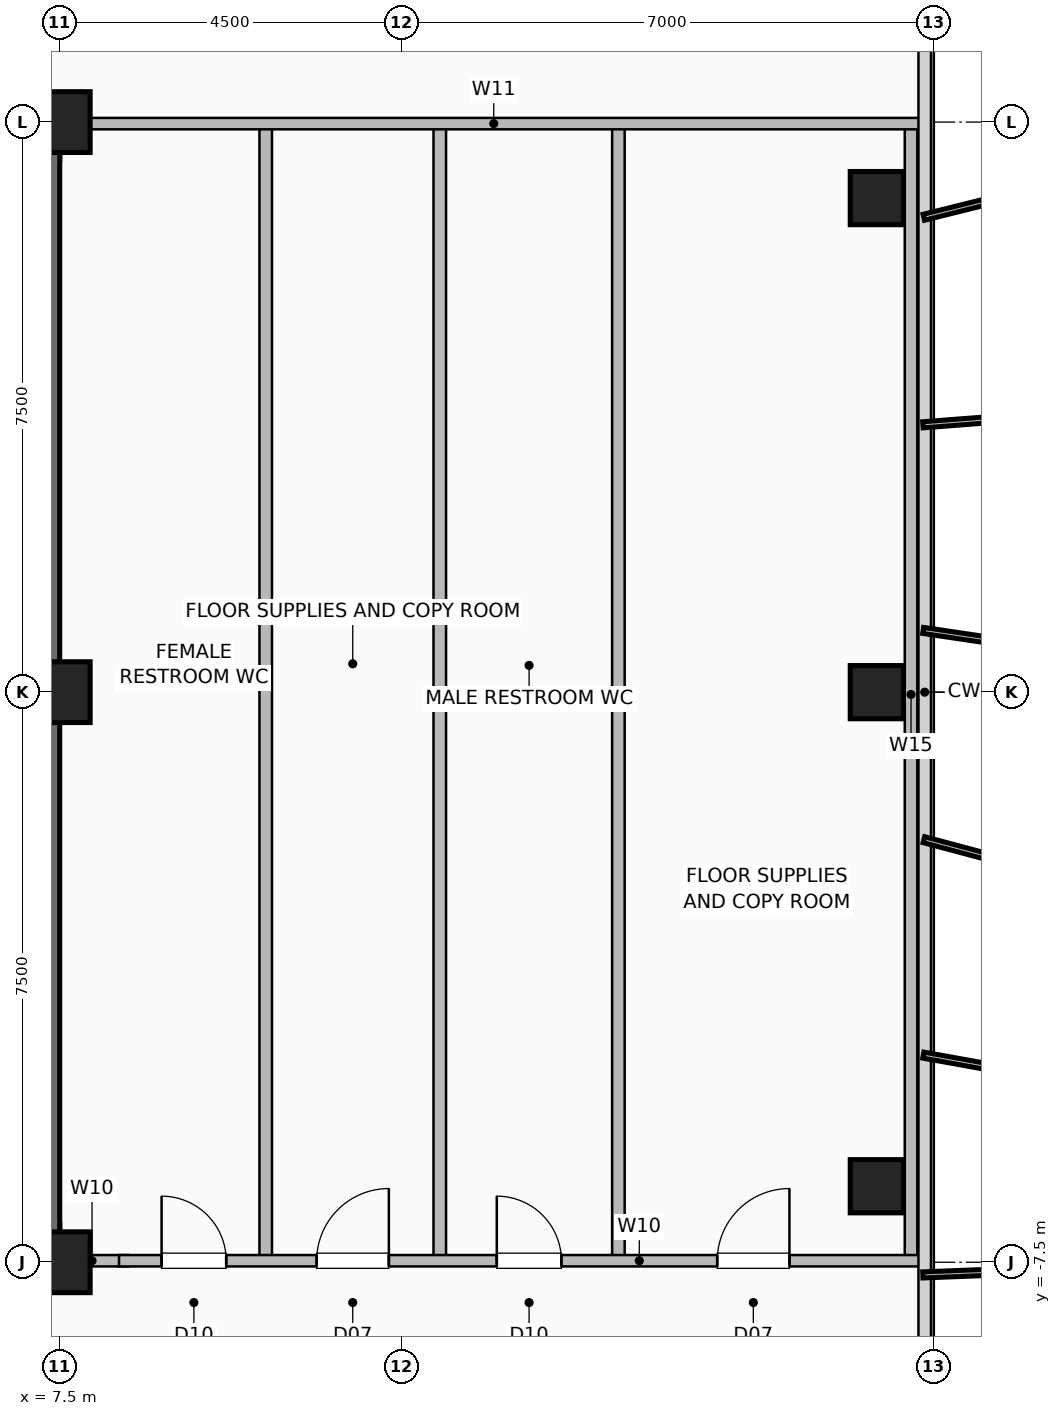
"""IFC4 building model, lengths in metres.
Left out: names, types, materials, properties, quantities, classifications, styles, units other than length and angle.
Written with IfcOpenShell. Run it as: python <this file> out.ifc"""

import sys

from ifc_helpers import new_model, si_unit, direction, frame, frame_2d, origin, origin_2d, place, context, subcontext, project, spatial, rectangle, hollow_rectangle, extrude, element, fill, save


model = new_model("IFC4")
c1 = context("Model", 3, precision=1e-05, world=origin(), true_north=direction((0.0, 1.0)))
c2 = subcontext(c1, "Body", "Model", "MODEL_VIEW")
j1 = project(units=[si_unit("LENGTHUNIT", "METRE"), si_unit("PLANEANGLEUNIT", "RADIAN")], contexts=[c1])
p1 = place(None, origin())
s1 = spatial("IfcSite", under=j1, at=p1, CompositionType="ELEMENT")
p2 = place(p1, origin())
s2 = spatial("IfcBuilding", under=s1, at=p2, CompositionType="ELEMENT")
p3 = place(p2, frame((0.0, 0.0, 282.8)))
s3 = spatial("IfcBuildingStorey", under=s2, at=p3, CompositionType="ELEMENT", Elevation=282.8)
for number, where, z_axis, x_axis in (
    (1, (7.5, -7.5, 0.0), (0.0, 0.0, 1.0), (1.0, 0.0, 0.0)),
    (2, (7.5, 0.0, 0.0), (0.0, 0.0, 1.0), (1.0, 0.0, 0.0)),
    (3, (7.5, 7.5, 0.0), (0.0, 0.0, 1.0), (1.0, 0.0, 0.0)),
):
    element("IfcColumn", number, at=place(p3, frame(where, z_axis=z_axis, x_axis=x_axis)), inside=s3, PredefinedType="COLUMN", context=c2, shape_type="SweptSolid", body=[
        extrude(hollow_rectangle(XDim=0.8, YDim=0.8, WallThickness=0.04, at=origin_2d()), origin(), (0.0, 0.0, 1.0), 3.6),
    ])
for number, where, z_axis, x_axis in (
    (4, (18.25, -6.5, 0.0), (0.0, 0.0, 1.0), (1.0, 0.0, 0.0)),
    (5, (18.25, 0.0, 0.0), (0.0, 0.0, 1.0), (1.0, 0.0, 0.0)),
    (6, (18.25, 6.5, 0.0), (0.0, 0.0, 1.0), (1.0, 0.0, 0.0)),
):
    element("IfcColumn", number, at=place(p3, frame(where, z_axis=z_axis, x_axis=x_axis)), inside=s3, PredefinedType="COLUMN", context=c2, shape_type="SweptSolid", body=[
        extrude(hollow_rectangle(XDim=0.7, YDim=0.7, WallThickness=0.035, at=origin_2d()), origin(), (0.0, 0.0, 1.0), 3.6),
    ])
p4 = place(p3, frame((-7.5, -7.25, 0.0), z_axis=(0.0, 0.0, 1.0), x_axis=(1.0, 0.0, 0.0)))
e7 = element("IfcWall", 7, at=p4, inside=s3, PredefinedType="SHEAR", context=c2, shape_type="SweptSolid", body=[
    extrude(rectangle(XDim=15.0, YDim=0.5, at=frame_2d((7.5, 0.0))), origin(), (0.0, 0.0, 1.0), 3.36),
])
p5 = place(p4, frame((1.55, 0.0, 0.0)))
e8 = element("IfcOpeningElement", 8, at=p5, cuts=e7, PredefinedType="OPENING", context=c2, shape_type="SweptSolid", body=[
    extrude(rectangle(XDim=1.05, YDim=2.08, at=frame_2d((0.525, 1.04))), frame((0.0, 0.26, 0.0), z_axis=(0.0, -1.0, 0.0), x_axis=(1.0, 0.0, 0.0)), (0.0, 0.0, 1.0), 0.52),
])
p6 = place(p4, frame((12.4, 0.0, 0.0)))
e9 = element("IfcOpeningElement", 9, at=p6, cuts=e7, PredefinedType="OPENING", context=c2, shape_type="SweptSolid", body=[
    extrude(rectangle(XDim=1.05, YDim=2.08, at=frame_2d((0.525, 1.04))), frame((0.0, 0.26, 0.0), z_axis=(0.0, -1.0, 0.0), x_axis=(1.0, 0.0, 0.0)), (0.0, 0.0, 1.0), 0.52),
])
p7 = place(p4, frame((5.2, 0.0, 0.0)))
e10 = element("IfcOpeningElement", 10, at=p7, cuts=e7, PredefinedType="OPENING", context=c2, shape_type="SweptSolid", body=[
    extrude(rectangle(XDim=1.0, YDim=2.08, at=frame_2d((0.5, 1.04))), frame((0.0, 0.26, 0.0), z_axis=(0.0, -1.0, 0.0), x_axis=(1.0, 0.0, 0.0)), (0.0, 0.0, 1.0), 0.52),
])
p8 = place(p4, frame((8.65, 0.0, 0.0)))
e11 = element("IfcOpeningElement", 11, at=p8, cuts=e7, PredefinedType="OPENING", context=c2, shape_type="SweptSolid", body=[
    extrude(rectangle(XDim=1.0, YDim=2.08, at=frame_2d((0.5, 1.04))), frame((0.0, 0.26, 0.0), z_axis=(0.0, -1.0, 0.0), x_axis=(1.0, 0.0, 0.0)), (0.0, 0.0, 1.0), 0.52),
])
for number, where, z_axis, x_axis in (
    (12, (-7.5, 7.25, 0.0), (0.0, 0.0, 1.0), (1.0, 0.0, 0.0)),
    (13, (7.25, -7.5, 0.0), (0.0, 0.0, 1.0), (0.0, 1.0, 0.0)),
):
    element("IfcWall", number, at=place(p3, frame(where, z_axis=z_axis, x_axis=x_axis)), inside=s3, PredefinedType="SHEAR", context=c2, shape_type="SweptSolid", body=[
        extrude(rectangle(XDim=15.0, YDim=0.5, at=frame_2d((7.5, 0.0))), origin(), (0.0, 0.0, 1.0), 3.36),
    ])
p9 = place(p3, frame((7.45, -7.48, 0.0), z_axis=(0.0, 0.0, 1.0), x_axis=(1.0, 0.0, 0.0)))
e14 = element("IfcWall", 14, at=p9, inside=s3, PredefinedType="PARTITIONING", context=c2, shape_type="SweptSolid", body=[
    extrude(rectangle(XDim=0.95, YDim=0.15, at=frame_2d((0.475, 0.0))), origin(), (0.0, 0.0, 1.0), 3.36),
])
for number, where, z_axis, x_axis in (
    (15, (10.21, -7.48, 0.0), (0.0, 0.0, 1.0), (0.0, 1.0, 0.0)),
    (16, (14.85, -7.48, 0.0), (0.0, 0.0, 1.0), (0.0, 1.0, 0.0)),
    (17, (12.5, -7.48, 0.0), (0.0, 0.0, 1.0), (0.0, 1.0, 0.0)),
    (18, (18.7, -7.48, 0.0), (0.0, 0.0, 1.0), (0.0, 1.0, 0.0)),
):
    element("IfcWall", number, at=place(p3, frame(where, z_axis=z_axis, x_axis=x_axis)), inside=s3, PredefinedType="PLUMBINGWALL", context=c2, shape_type="SweptSolid", body=[
        extrude(rectangle(XDim=14.9, YDim=0.165, at=frame_2d((7.45, 0.0))), origin(), (0.0, 0.0, 1.0), 3.36),
    ])
p10 = place(p3, frame((8.28, -7.48, 0.0), z_axis=(0.0, 0.0, 1.0), x_axis=(1.0, 0.0, 0.0)))
e19 = element("IfcWall", 19, at=p10, inside=s3, PredefinedType="PARTITIONING", context=c2, shape_type="SweptSolid", body=[
    extrude(rectangle(XDim=10.54, YDim=0.15, at=frame_2d((5.27, 0.0))), origin(), (0.0, 0.0, 1.0), 3.36),
])
p11 = place(p10, frame((0.56, 0.0, 0.0)))
e20 = element("IfcOpeningElement", 20, at=p11, cuts=e19, PredefinedType="OPENING", context=c2, shape_type="SweptSolid", body=[
    extrude(rectangle(XDim=0.85, YDim=2.05, at=frame_2d((0.425, 1.025))), frame((0.0, 0.085, 0.0), z_axis=(0.0, -1.0, 0.0), x_axis=(1.0, 0.0, 0.0)), (0.0, 0.0, 1.0), 0.17),
])
p12 = place(p10, frame((2.6, 0.0, 0.0)))
e21 = element("IfcOpeningElement", 21, at=p12, cuts=e19, PredefinedType="OPENING", context=c2, shape_type="SweptSolid", body=[
    extrude(rectangle(XDim=0.95, YDim=2.06, at=frame_2d((0.475, 1.03))), frame((0.0, 0.085, 0.0), z_axis=(0.0, -1.0, 0.0), x_axis=(1.0, 0.0, 0.0)), (0.0, 0.0, 1.0), 0.17),
])
p13 = place(p10, frame((4.97, 0.0, 0.0)))
e22 = element("IfcOpeningElement", 22, at=p13, cuts=e19, PredefinedType="OPENING", context=c2, shape_type="SweptSolid", body=[
    extrude(rectangle(XDim=0.85, YDim=2.05, at=frame_2d((0.425, 1.025))), frame((0.0, 0.085, 0.0), z_axis=(0.0, -1.0, 0.0), x_axis=(1.0, 0.0, 0.0)), (0.0, 0.0, 1.0), 0.17),
])
p14 = place(p10, frame((7.87, 0.0, 0.0)))
e23 = element("IfcOpeningElement", 23, at=p14, cuts=e19, PredefinedType="OPENING", context=c2, shape_type="SweptSolid", body=[
    extrude(rectangle(XDim=0.95, YDim=2.06, at=frame_2d((0.475, 1.03))), frame((0.0, 0.085, 0.0), z_axis=(0.0, -1.0, 0.0), x_axis=(1.0, 0.0, 0.0)), (0.0, 0.0, 1.0), 0.17),
])
p15 = place(p3, frame((7.6, 7.48, 0.0), z_axis=(0.0, 0.0, 1.0), x_axis=(1.0, 0.0, 0.0)))
e24 = element("IfcWall", 24, at=p15, inside=s3, PredefinedType="PARTITIONING", context=c2, shape_type="SweptSolid", body=[
    extrude(rectangle(XDim=11.22, YDim=0.15, at=frame_2d((5.61, 0.0))), origin(), (0.0, 0.0, 1.0), 3.36),
])
p16 = place(p11, origin())
e25 = element("IfcDoor", 25, at=p16, inside=s3, OperationType="SINGLE_SWING_LEFT", PredefinedType="DOOR", context=c2, shape_type="SweptSolid", body=[
    extrude(rectangle(XDim=0.85, YDim=2.05, at=frame_2d((0.425, 1.025))), frame((0.0, 0.025, 0.0), z_axis=(0.0, -1.0, 0.0), x_axis=(1.0, 0.0, 0.0)), (0.0, 0.0, 1.0), 0.05),
])
fill(e20, e25)
p17 = place(p12, origin())
e26 = element("IfcDoor", 26, at=p17, inside=s3, OperationType="SINGLE_SWING_RIGHT", PredefinedType="DOOR", context=c2, shape_type="SweptSolid", body=[
    extrude(rectangle(XDim=0.95, YDim=2.06, at=frame_2d((0.475, 1.03))), frame((0.0, 0.025, 0.0), z_axis=(0.0, -1.0, 0.0), x_axis=(1.0, 0.0, 0.0)), (0.0, 0.0, 1.0), 0.05),
])
fill(e21, e26)
p18 = place(p13, origin())
e27 = element("IfcDoor", 27, at=p18, inside=s3, OperationType="SINGLE_SWING_LEFT", PredefinedType="DOOR", context=c2, shape_type="SweptSolid", body=[
    extrude(rectangle(XDim=0.85, YDim=2.05, at=frame_2d((0.425, 1.025))), frame((0.0, 0.025, 0.0), z_axis=(0.0, -1.0, 0.0), x_axis=(1.0, 0.0, 0.0)), (0.0, 0.0, 1.0), 0.05),
])
fill(e22, e27)
p19 = place(p14, origin())
e28 = element("IfcDoor", 28, at=p19, inside=s3, OperationType="SINGLE_SWING_RIGHT", PredefinedType="DOOR", context=c2, shape_type="SweptSolid", body=[
    extrude(rectangle(XDim=0.95, YDim=2.06, at=frame_2d((0.475, 1.03))), frame((0.0, 0.025, 0.0), z_axis=(0.0, -1.0, 0.0), x_axis=(1.0, 0.0, 0.0)), (0.0, 0.0, 1.0), 0.05),
])
fill(e23, e28)
save(model, sys.argv[1])
